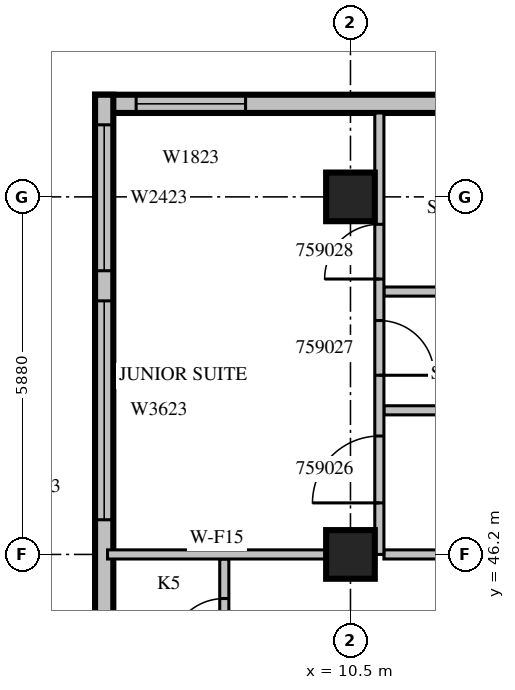
"""IFC4 building model, lengths in metres.
Left out: names, types, materials, properties, quantities, classifications, styles, units other than length and angle.
Written with IfcOpenShell. Run it as: python <this file> out.ifc"""

import sys

from ifc_helpers import new_model, si_unit, direction, frame, frame_2d, origin, origin_2d, place, context, subcontext, project, spatial, rectangle, extrude, source, transform, mapped, element, fill, save


model = new_model("IFC4")
c1 = context("Model", 3, precision=1e-05, world=origin(), true_north=direction((0.0, 1.0)))
c2 = subcontext(c1, "Body", "Model", "MODEL_VIEW")
j1 = project(units=[si_unit("LENGTHUNIT", "METRE"), si_unit("PLANEANGLEUNIT", "RADIAN")], contexts=[c1])
p1 = place(None, origin())
s1 = spatial("IfcSite", under=j1, at=p1, CompositionType="ELEMENT")
p2 = place(p1, origin())
s2 = spatial("IfcBuilding", under=s1, at=p2, CompositionType="ELEMENT")
p3 = place(p2, frame((0.0, 0.0, 257.6)))
s3 = spatial("IfcBuildingStorey", under=s2, at=p3, CompositionType="ELEMENT", Elevation=257.6)
m1 = source(origin(), c2, "Body", "SweptSolid", [
    extrude(rectangle(XDim=0.8, YDim=0.8, at=origin_2d()), origin(), (0.0, 0.0, 1.0), 3.8),
])
for number, where, z_axis, x_axis in (
    (1, (10.5, 46.2, 0.0), (0.0, 0.0, 1.0), (1.0, 0.0, 0.0)),
    (2, (10.5, 52.08, 0.0), (0.0, 0.0, 1.0), (1.0, 0.0, 0.0)),
):
    element("IfcColumn", number, at=place(p3, frame(where, z_axis=z_axis, x_axis=x_axis)), inside=s3, PredefinedType="COLUMN", context=c2, shape_type="MappedRepresentation", body=[
        mapped(m1, transform((0.0, 0.0, 0.0), scale=1.0)),
    ])
m2 = source(origin(), c2, "Body", "SweptSolid", [
    extrude(rectangle(XDim=10.5, YDim=0.3, at=frame_2d((5.25, 0.0))), origin(), (0.0, 0.0, 1.0), 3.4),
])
p4 = place(p3, frame((16.8, 53.61, 0.0), z_axis=(0.0, 0.0, 1.0), x_axis=(-1.0, 0.0, 0.0)))
e3 = element("IfcWall", 3, at=p4, inside=s3, PredefinedType="STANDARD", context=c2, shape_type="MappedRepresentation", body=[
    mapped(m2, transform((0.0, 0.0, 0.0), scale=1.0)),
])
m3 = source(origin(), c2, "Body", "SweptSolid", [
    extrude(rectangle(XDim=1.2, YDim=2.3, at=frame_2d((0.6, 1.15))), frame((0.0, 0.16, 0.0), z_axis=(0.0, -1.0, 0.0), x_axis=(1.0, 0.0, 0.0)), (0.0, 0.0, 1.0), 0.32),
])
p5 = place(p4, frame((2.15, 0.0, 0.6)))
e4 = element("IfcOpeningElement", 4, at=p5, cuts=e3, PredefinedType="OPENING", context=c2, shape_type="MappedRepresentation", body=[
    mapped(m3, transform((0.0, 0.0, 0.0), scale=1.0)),
])
m4 = source(origin(), c2, "Body", "SweptSolid", [
    extrude(rectangle(XDim=1.8, YDim=2.3, at=frame_2d((0.9, 1.15))), frame((0.0, 0.16, 0.0), z_axis=(0.0, -1.0, 0.0), x_axis=(1.0, 0.0, 0.0)), (0.0, 0.0, 1.0), 0.32),
])
p6 = place(p4, frame((8.025, 0.0, 0.6)))
e5 = element("IfcOpeningElement", 5, at=p6, cuts=e3, PredefinedType="OPENING", context=c2, shape_type="MappedRepresentation", body=[
    mapped(m4, transform((0.0, 0.0, 0.0), scale=1.0)),
])
m5 = source(origin(), c2, "Body", "SweptSolid", [
    extrude(rectangle(XDim=9.91, YDim=0.3, at=frame_2d((4.955, 0.0))), origin(), (0.0, 0.0, 1.0), 3.4),
])
p7 = place(p3, frame((6.45, 53.76, 0.0), z_axis=(0.0, 0.0, 1.0), x_axis=(0.0, -1.0, 0.0)))
e6 = element("IfcWall", 6, at=p7, inside=s3, PredefinedType="STANDARD", context=c2, shape_type="MappedRepresentation", body=[
    mapped(m5, transform((0.0, 0.0, 0.0), scale=1.0)),
])
m6 = source(origin(), c2, "Body", "SweptSolid", [
    extrude(rectangle(XDim=3.6, YDim=2.3, at=frame_2d((1.8, 1.15))), frame((0.0, 0.16, 0.0), z_axis=(0.0, -1.0, 0.0), x_axis=(1.0, 0.0, 0.0)), (0.0, 0.0, 1.0), 0.32),
])
p8 = place(p7, frame((3.39, 0.0, 0.6)))
e7 = element("IfcOpeningElement", 7, at=p8, cuts=e6, PredefinedType="OPENING", context=c2, shape_type="MappedRepresentation", body=[
    mapped(m6, transform((0.0, 0.0, 0.0), scale=1.0)),
])
m7 = source(origin(), c2, "Body", "SweptSolid", [
    extrude(rectangle(XDim=2.4, YDim=2.3, at=frame_2d((1.2, 1.15))), frame((0.0, 0.16, 0.0), z_axis=(0.0, -1.0, 0.0), x_axis=(1.0, 0.0, 0.0)), (0.0, 0.0, 1.0), 0.32),
])
p9 = place(p7, frame((0.495, 0.0, 0.6)))
e8 = element("IfcOpeningElement", 8, at=p9, cuts=e6, PredefinedType="OPENING", context=c2, shape_type="MappedRepresentation", body=[
    mapped(m7, transform((0.0, 0.0, 0.0), scale=1.0)),
])
m8 = source(origin(), c2, "Body", "SweptSolid", [
    extrude(rectangle(XDim=2.2, YDim=0.15, at=frame_2d((1.1, 0.0))), origin(), (0.0, 0.0, 1.0), 3.4),
])
p10 = place(p3, frame((8.425, 43.925, 0.0), z_axis=(0.0, 0.0, 1.0), x_axis=(0.0, 1.0, 0.0)))
e9 = element("IfcWall", 9, at=p10, inside=s3, PredefinedType="PARTITIONING", context=c2, shape_type="MappedRepresentation", body=[
    mapped(m8, transform((0.0, 0.0, 0.0), scale=1.0)),
])
m9 = source(origin(), c2, "Body", "SweptSolid", [
    extrude(rectangle(XDim=0.9, YDim=2.1, at=frame_2d((0.45, 1.05))), frame((0.0, 0.085, 0.0), z_axis=(0.0, -1.0, 0.0), x_axis=(1.0, 0.0, 0.0)), (0.0, 0.0, 1.0), 0.17),
])
p11 = place(p10, frame((0.65, 0.0, 0.0)))
e10 = element("IfcOpeningElement", 10, at=p11, cuts=e9, PredefinedType="OPENING", context=c2, shape_type="MappedRepresentation", body=[
    mapped(m9, transform((0.0, 0.0, 0.0), scale=1.0)),
])
m10 = source(origin(), c2, "Body", "SweptSolid", [
    extrude(rectangle(XDim=3.95, YDim=0.15, at=frame_2d((1.975, 0.0))), origin(), (0.0, 0.0, 1.0), 3.4),
])
for number, where, z_axis, x_axis in (
    (11, (15.0, 48.57, 0.0), (0.0, 0.0, 1.0), (-1.0, 0.0, 0.0)),
    (12, (15.0, 50.523, 0.0), (0.0, 0.0, 1.0), (-1.0, 0.0, 0.0)),
):
    element("IfcWall", number, at=place(p3, frame(where, z_axis=z_axis, x_axis=x_axis)), inside=s3, PredefinedType="PARTITIONING", context=c2, shape_type="MappedRepresentation", body=[
        mapped(m10, transform((0.0, 0.0, 0.0), scale=1.0)),
    ])
m11 = source(origin(), c2, "Body", "SweptSolid", [
    extrude(rectangle(XDim=3.596, YDim=0.15, at=frame_2d((1.798, 0.0))), origin(), (0.0, 0.0, 1.0), 3.4),
])
p12 = place(p3, frame((10.101, 46.2, 0.0), z_axis=(0.0, 0.0, 1.0), x_axis=(-1.0, 0.0, 0.0)))
e13 = element("IfcWall", 13, at=p12, inside=s3, PredefinedType="PARTITIONING", context=c2, shape_type="MappedRepresentation", body=[
    mapped(m11, transform((0.0, 0.0, 0.0), scale=1.0)),
])
p13 = place(p3, frame((15.0, 46.2, 0.0), z_axis=(0.0, 0.0, 1.0), x_axis=(-1.0, 0.0, 0.0)))
e14 = element("IfcWall", 14, at=p13, inside=s3, PredefinedType="PARTITIONING", context=c2, shape_type="MappedRepresentation", body=[
    mapped(m10, transform((0.0, 0.0, 0.0), scale=1.0)),
])
m12 = source(origin(), c2, "Body", "SweptSolid", [
    extrude(rectangle(XDim=7.26, YDim=0.15, at=frame_2d((3.63, 0.0))), origin(), (0.0, 0.0, 1.0), 3.4),
])
p14 = place(p3, frame((10.975, 46.2, 0.0), z_axis=(0.0, 0.0, 1.0), x_axis=(0.0, 1.0, 0.0)))
e15 = element("IfcWall", 15, at=p14, inside=s3, PredefinedType="PARTITIONING", context=c2, shape_type="MappedRepresentation", body=[
    mapped(m12, transform((0.0, 0.0, 0.0), scale=1.0)),
])
m13 = source(origin(), c2, "Body", "SweptSolid", [
    extrude(rectangle(XDim=1.1, YDim=2.1, at=frame_2d((0.55, 1.05))), frame((0.0, 0.085, 0.0), z_axis=(0.0, -1.0, 0.0), x_axis=(1.0, 0.0, 0.0)), (0.0, 0.0, 1.0), 0.17),
])
p15 = place(p14, frame((0.847, 0.0, 0.0)))
e16 = element("IfcOpeningElement", 16, at=p15, cuts=e15, PredefinedType="OPENING", context=c2, shape_type="MappedRepresentation", body=[
    mapped(m13, transform((0.0, 0.0, 0.0), scale=1.0)),
])
p16 = place(p14, frame((2.946, 0.0, 0.0)))
e17 = element("IfcOpeningElement", 17, at=p16, cuts=e15, PredefinedType="OPENING", context=c2, shape_type="MappedRepresentation", body=[
    mapped(m9, transform((0.0, 0.0, 0.0), scale=1.0)),
])
p17 = place(p14, frame((4.529, 0.0, 0.0)))
e18 = element("IfcOpeningElement", 18, at=p17, cuts=e15, PredefinedType="OPENING", context=c2, shape_type="MappedRepresentation", body=[
    mapped(m9, transform((0.0, 0.0, 0.0), scale=1.0)),
])
m14 = source(origin(), c2, "Body", "SweptSolid", [
    extrude(rectangle(XDim=1.8, YDim=2.3, at=frame_2d((0.9, 1.15))), frame((0.0, 0.03, 0.0), z_axis=(0.0, -1.0, 0.0), x_axis=(1.0, 0.0, 0.0)), (0.0, 0.0, 1.0), 0.06),
])
p18 = place(p6, origin())
e19 = element("IfcWindow", 19, at=p18, inside=s3, PartitioningType="SINGLE_PANEL", PredefinedType="WINDOW", context=c2, shape_type="MappedRepresentation", body=[
    mapped(m14, transform((0.0, 0.0, 0.0), scale=1.0)),
])
fill(e5, e19)
m15 = source(origin(), c2, "Body", "SweptSolid", [
    extrude(rectangle(XDim=3.6, YDim=2.3, at=frame_2d((1.8, 1.15))), frame((0.0, 0.03, 0.0), z_axis=(0.0, -1.0, 0.0), x_axis=(1.0, 0.0, 0.0)), (0.0, 0.0, 1.0), 0.06),
])
p19 = place(p8, origin())
e20 = element("IfcWindow", 20, at=p19, inside=s3, PartitioningType="SINGLE_PANEL", PredefinedType="WINDOW", context=c2, shape_type="MappedRepresentation", body=[
    mapped(m15, transform((0.0, 0.0, 0.0), scale=1.0)),
])
fill(e7, e20)
m16 = source(origin(), c2, "Body", "SweptSolid", [
    extrude(rectangle(XDim=2.4, YDim=2.3, at=frame_2d((1.2, 1.15))), frame((0.0, 0.03, 0.0), z_axis=(0.0, -1.0, 0.0), x_axis=(1.0, 0.0, 0.0)), (0.0, 0.0, 1.0), 0.06),
])
p20 = place(p9, origin())
e21 = element("IfcWindow", 21, at=p20, inside=s3, PartitioningType="SINGLE_PANEL", PredefinedType="WINDOW", context=c2, shape_type="MappedRepresentation", body=[
    mapped(m16, transform((0.0, 0.0, 0.0), scale=1.0)),
])
fill(e8, e21)
m17 = source(origin(), c2, "Body", "SweptSolid", [
    extrude(rectangle(XDim=0.9, YDim=2.1, at=frame_2d((0.45, 1.05))), frame((0.0, 0.025, 0.0), z_axis=(0.0, -1.0, 0.0), x_axis=(1.0, 0.0, 0.0)), (0.0, 0.0, 1.0), 0.05),
])
p21 = place(p11, origin())
e22 = element("IfcDoor", 22, at=p21, inside=s3, OperationType="SINGLE_SWING_LEFT", PredefinedType="DOOR", context=c2, shape_type="MappedRepresentation", body=[
    mapped(m17, transform((0.0, 0.0, 0.0), scale=1.0)),
])
fill(e10, e22)
m18 = source(origin(), c2, "Body", "SweptSolid", [
    extrude(rectangle(XDim=1.1, YDim=2.1, at=frame_2d((0.55, 1.05))), frame((0.0, 0.025, 0.0), z_axis=(0.0, -1.0, 0.0), x_axis=(1.0, 0.0, 0.0)), (0.0, 0.0, 1.0), 0.05),
])
p22 = place(p15, origin())
e23 = element("IfcDoor", 23, at=p22, inside=s3, OperationType="SINGLE_SWING_LEFT", PredefinedType="DOOR", context=c2, shape_type="MappedRepresentation", body=[
    mapped(m18, transform((0.0, 0.0, 0.0), scale=1.0)),
])
fill(e16, e23)
p23 = place(p16, origin())
e24 = element("IfcDoor", 24, at=p23, inside=s3, OperationType="SINGLE_SWING_RIGHT", PredefinedType="DOOR", context=c2, shape_type="MappedRepresentation", body=[
    mapped(m17, transform((0.0, 0.0, 0.0), scale=1.0)),
])
fill(e17, e24)
p24 = place(p17, origin())
e25 = element("IfcDoor", 25, at=p24, inside=s3, OperationType="SINGLE_SWING_LEFT", PredefinedType="DOOR", context=c2, shape_type="MappedRepresentation", body=[
    mapped(m17, transform((0.0, 0.0, 0.0), scale=1.0)),
])
fill(e18, e25)
save(model, sys.argv[1])
